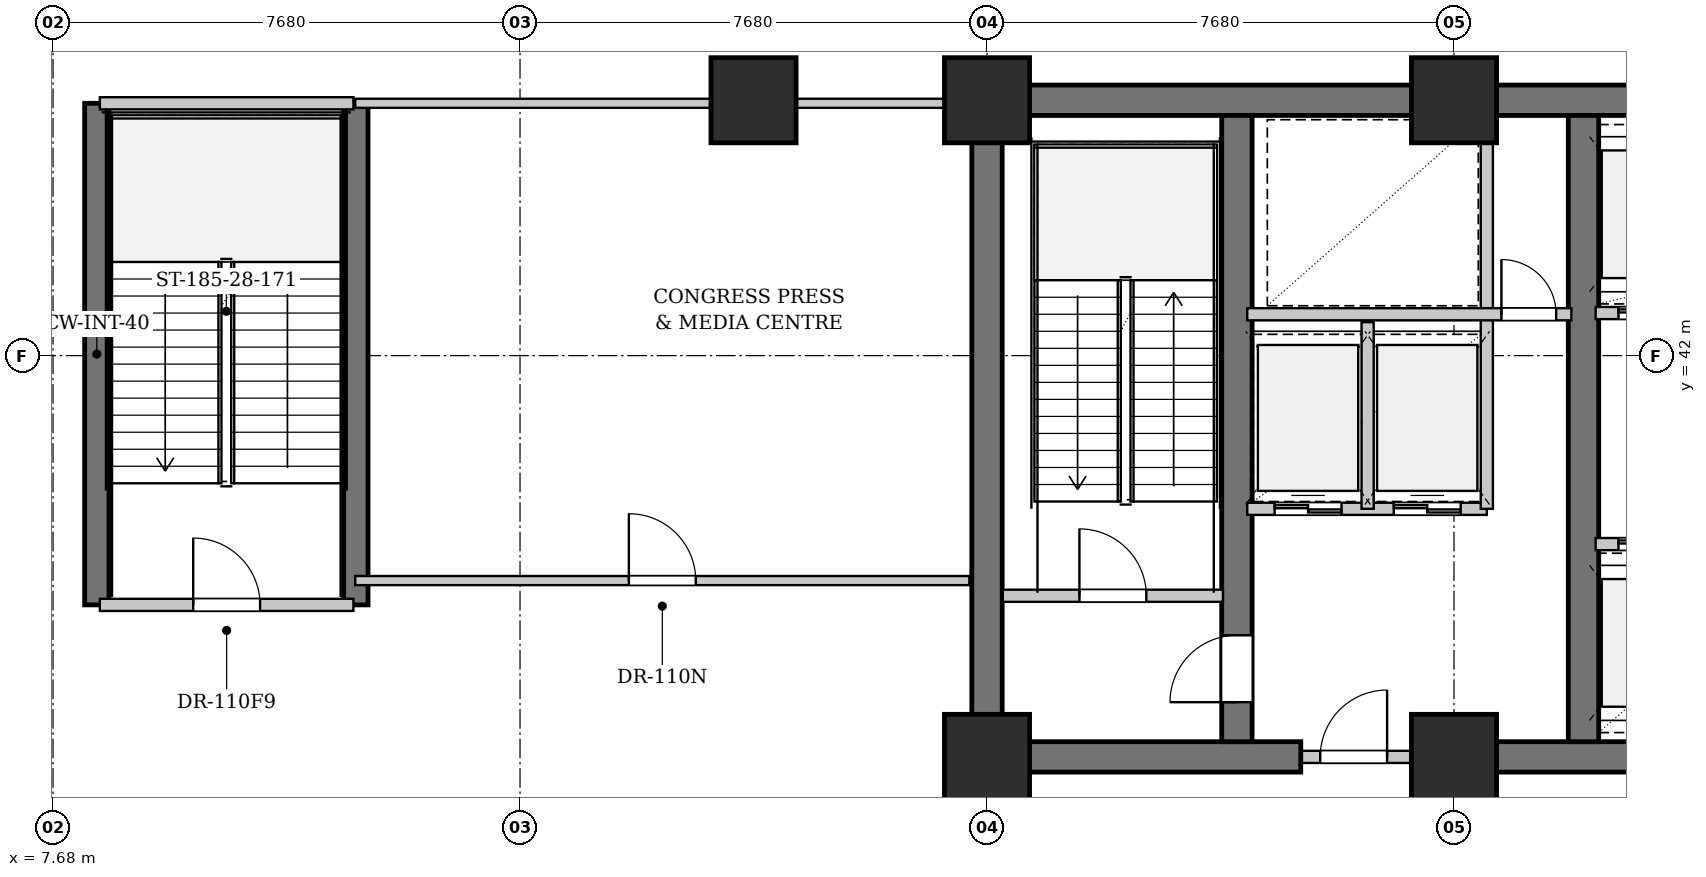
"""IFC4 building model, lengths in metres.
Left out: names, types, materials, properties, quantities, classifications, styles, units other than length and angle.
Written with IfcOpenShell. Run it as: python <this file> out.ifc"""

import sys

from ifc_helpers import new_model, si_unit, direction, frame, frame_2d, origin, origin_2d, place, context, subcontext, project, spatial, rectangle, extrude, element, fill, save


model = new_model("IFC4")
c1 = context("Model", 3, precision=1e-05, world=origin(), true_north=direction((0.0, 1.0)))
c2 = subcontext(c1, "Body", "Model", "MODEL_VIEW")
j1 = project(units=[si_unit("LENGTHUNIT", "METRE"), si_unit("PLANEANGLEUNIT", "RADIAN")], contexts=[c1])
p1 = place(None, origin())
s1 = spatial("IfcSite", under=j1, at=p1, CompositionType="ELEMENT")
p2 = place(p1, origin())
s2 = spatial("IfcBuilding", under=s1, at=p2, CompositionType="ELEMENT")
p3 = place(p2, frame((0.0, 0.0, 20.4)))
s3 = spatial("IfcBuildingStorey", under=s2, at=p3, CompositionType="ELEMENT", Elevation=20.4)
p4 = place(p3, frame((22.79, 46.2, 0.0), z_axis=(0.0, 0.0, 1.0), x_axis=(1.0, 0.0, 0.0)))
e1 = element("IfcWall", 1, at=p4, inside=s3, PredefinedType="SHEAR", context=c2, shape_type="SweptSolid", body=[
    extrude(rectangle(XDim=31.22, YDim=0.5, at=frame_2d((15.61, 0.0))), origin(), (0.0, 0.0, 1.0), 4.38),
])
p5 = place(p3, frame((22.79, 35.4, 0.0), z_axis=(0.0, 0.0, 1.0), x_axis=(1.0, 0.0, 0.0)))
e2 = element("IfcWall", 2, at=p5, inside=s3, PredefinedType="SHEAR", context=c2, shape_type="SweptSolid", body=[
    extrude(rectangle(XDim=5.41, YDim=0.5, at=frame_2d((2.705, 0.0))), origin(), (0.0, 0.0, 1.0), 4.38),
])
p6 = place(p3, frame((30.72, 35.4, 0.0), z_axis=(0.0, 0.0, 1.0), x_axis=(1.0, 0.0, 0.0)))
e3 = element("IfcWall", 3, at=p6, inside=s3, PredefinedType="SHEAR", context=c2, shape_type="SweptSolid", body=[
    extrude(rectangle(XDim=4.88, YDim=0.5, at=frame_2d((2.44, 0.0))), origin(), (0.0, 0.0, 1.0), 4.38),
])
p7 = place(p3, frame((23.04, 35.65, 0.0), z_axis=(0.0, 0.0, 1.0), x_axis=(0.0, 1.0, 0.0)))
e4 = element("IfcWall", 4, at=p7, inside=s3, PredefinedType="SHEAR", context=c2, shape_type="SweptSolid", body=[
    extrude(rectangle(XDim=10.3, YDim=0.5, at=frame_2d((5.15, 0.0))), origin(), (0.0, 0.0, 1.0), 4.38),
])
p8 = place(p3, frame((27.15, 35.65, 0.0), z_axis=(0.0, 0.0, 1.0), x_axis=(0.0, 1.0, 0.0)))
e5 = element("IfcWall", 5, at=p8, inside=s3, PredefinedType="SHEAR", context=c2, shape_type="SweptSolid", body=[
    extrude(rectangle(XDim=10.3, YDim=0.5, at=frame_2d((5.15, 0.0))), origin(), (0.0, 0.0, 1.0), 4.38),
])
p9 = place(p8, frame((0.65, 0.0, 0.0)))
e6 = element("IfcOpeningElement", 6, at=p9, cuts=e5, PredefinedType="OPENING", context=c2, shape_type="SweptSolid", body=[
    extrude(rectangle(XDim=1.1, YDim=2.15, at=frame_2d((0.55, 1.075))), frame((0.0, 0.26, 0.0), z_axis=(0.0, -1.0, 0.0), x_axis=(1.0, 0.0, 0.0)), (0.0, 0.0, 1.0), 0.52),
])
p10 = place(p3, frame((32.85, 35.65, 0.0), z_axis=(0.0, 0.0, 1.0), x_axis=(0.0, 1.0, 0.0)))
e7 = element("IfcWall", 7, at=p10, inside=s3, PredefinedType="SHEAR", context=c2, shape_type="SweptSolid", body=[
    extrude(rectangle(XDim=10.3, YDim=0.5, at=frame_2d((5.15, 0.0))), origin(), (0.0, 0.0, 1.0), 4.38),
])
for number, where, z_axis, x_axis in (
    (8, (8.4, 37.9, 0.0), (0.0, 0.0, 1.0), (0.0, 1.0, 0.0)),
    (9, (12.66, 37.9, 0.0), (0.0, 0.0, 1.0), (0.0, 1.0, 0.0)),
):
    element("IfcWall", number, at=place(p3, frame(where, z_axis=z_axis, x_axis=x_axis)), inside=s3, PredefinedType="SHEAR", context=c2, shape_type="SweptSolid", body=[
        extrude(rectangle(XDim=8.25, YDim=0.4, at=frame_2d((4.125, 0.0))), origin(), (0.0, 0.0, 1.0), 4.38),
    ])
for number, where, z_axis, x_axis in (
    (10, (23.04, 35.4, 0.0), (0.0, 0.0, 1.0), (1.0, 0.0, 0.0)),
    (11, (23.04, 46.2, 0.0), (0.0, 0.0, 1.0), (1.0, 0.0, 0.0)),
    (12, (30.72, 35.4, 0.0), (0.0, 0.0, 1.0), (1.0, 0.0, 0.0)),
    (13, (30.72, 46.2, 0.0), (0.0, 0.0, 1.0), (1.0, 0.0, 0.0)),
    (14, (19.2, 46.2, 0.0), (0.0, 0.0, 1.0), (1.0, 0.0, 0.0)),
):
    element("IfcColumn", number, at=place(p3, frame(where, z_axis=z_axis, x_axis=x_axis)), inside=s3, PredefinedType="COLUMN", context=c2, shape_type="SweptSolid", body=[
        extrude(rectangle(XDim=1.4, YDim=1.4, at=origin_2d()), origin(), (0.0, 0.0, 1.0), 4.8),
    ])
p11 = place(p3, frame((23.3, 38.05, 0.0), z_axis=(0.0, 0.0, 1.0), x_axis=(1.0, 0.0, 0.0)))
e15 = element("IfcWall", 15, at=p11, inside=s3, PredefinedType="PARTITIONING", context=c2, shape_type="SweptSolid", body=[
    extrude(rectangle(XDim=3.62, YDim=0.2, at=frame_2d((1.81, 0.0))), origin(), (0.0, 0.0, 1.0), 4.38),
])
p12 = place(p11, frame((1.26, 0.0, 0.0)))
e16 = element("IfcOpeningElement", 16, at=p12, cuts=e15, PredefinedType="OPENING", context=c2, shape_type="SweptSolid", body=[
    extrude(rectangle(XDim=1.1, YDim=2.15, at=frame_2d((0.55, 1.075))), frame((0.0, 0.11, 0.0), z_axis=(0.0, -1.0, 0.0), x_axis=(1.0, 0.0, 0.0)), (0.0, 0.0, 1.0), 0.22),
])
p13 = place(p3, frame((28.22, 35.4, 0.0), z_axis=(0.0, 0.0, 1.0), x_axis=(1.0, 0.0, 0.0)))
e17 = element("IfcWall", 17, at=p13, inside=s3, PredefinedType="PARTITIONING", context=c2, shape_type="SweptSolid", body=[
    extrude(rectangle(XDim=2.5, YDim=0.2, at=frame_2d((1.25, 0.0))), origin(), (0.0, 0.0, 1.0), 3.575),
])
p14 = place(p13, frame((0.3, 0.0, 0.0)))
e18 = element("IfcOpeningElement", 18, at=p14, cuts=e17, PredefinedType="OPENING", context=c2, shape_type="SweptSolid", body=[
    extrude(rectangle(XDim=1.1, YDim=2.15, at=frame_2d((0.55, 1.075))), frame((0.0, 0.11, 0.0), z_axis=(0.0, -1.0, 0.0), x_axis=(1.0, 0.0, 0.0)), (0.0, 0.0, 1.0), 0.22),
])
p15 = place(p3, frame((27.32, 39.48, 0.0), z_axis=(0.0, 0.0, 1.0), x_axis=(1.0, 0.0, 0.0)))
e19 = element("IfcWall", 19, at=p15, inside=s3, PredefinedType="PARTITIONING", context=c2, shape_type="SweptSolid", body=[
    extrude(rectangle(XDim=3.94, YDim=0.2, at=frame_2d((1.97, 0.0))), origin(), (0.0, 0.0, 1.0), 4.38),
])
p16 = place(p15, frame((0.45, 0.0, 0.0)))
e20 = element("IfcOpeningElement", 20, at=p16, cuts=e19, PredefinedType="OPENING", context=c2, shape_type="SweptSolid", body=[
    extrude(rectangle(XDim=1.1, YDim=2.2, at=frame_2d((0.55, 1.1))), frame((0.0, 0.11, 0.0), z_axis=(0.0, -1.0, 0.0), x_axis=(1.0, 0.0, 0.0)), (0.0, 0.0, 1.0), 0.22),
])
p17 = place(p15, frame((2.41, 0.0, 0.0)))
e21 = element("IfcOpeningElement", 21, at=p17, cuts=e19, PredefinedType="OPENING", context=c2, shape_type="SweptSolid", body=[
    extrude(rectangle(XDim=1.1, YDim=2.2, at=frame_2d((0.55, 1.1))), frame((0.0, 0.11, 0.0), z_axis=(0.0, -1.0, 0.0), x_axis=(1.0, 0.0, 0.0)), (0.0, 0.0, 1.0), 0.22),
])
p18 = place(p3, frame((29.3, 39.48, 0.0), z_axis=(0.0, 0.0, 1.0), x_axis=(0.0, 1.0, 0.0)))
e22 = element("IfcWall", 22, at=p18, inside=s3, PredefinedType="PARTITIONING", context=c2, shape_type="SweptSolid", body=[
    extrude(rectangle(XDim=3.07, YDim=0.2, at=frame_2d((1.535, 0.0))), origin(), (0.0, 0.0, 1.0), 4.38),
])
p19 = place(p3, frame((31.26, 39.48, 0.0), z_axis=(0.0, 0.0, 1.0), x_axis=(0.0, 1.0, 0.0)))
e23 = element("IfcWall", 23, at=p19, inside=s3, PredefinedType="PARTITIONING", context=c2, shape_type="SweptSolid", body=[
    extrude(rectangle(XDim=6.44, YDim=0.2, at=frame_2d((3.22, 0.0))), origin(), (0.0, 0.0, 1.0), 4.38),
])
p20 = place(p3, frame((27.32, 42.68, 0.0), z_axis=(0.0, 0.0, 1.0), x_axis=(1.0, 0.0, 0.0)))
e24 = element("IfcWall", 24, at=p20, inside=s3, PredefinedType="PARTITIONING", context=c2, shape_type="SweptSolid", body=[
    extrude(rectangle(XDim=5.33, YDim=0.2, at=frame_2d((2.665, 0.0))), origin(), (0.0, 0.0, 1.0), 4.38),
])
p21 = place(p20, frame((4.18, 0.0, 0.0)))
e25 = element("IfcOpeningElement", 25, at=p21, cuts=e24, PredefinedType="OPENING", context=c2, shape_type="SweptSolid", body=[
    extrude(rectangle(XDim=0.9, YDim=2.15, at=frame_2d((0.45, 1.075))), frame((0.0, 0.11, 0.0), z_axis=(0.0, -1.0, 0.0), x_axis=(1.0, 0.0, 0.0)), (0.0, 0.0, 1.0), 0.22),
])
p22 = place(p3, frame((33.05, 38.9, 0.0), z_axis=(0.0, 0.0, 1.0), x_axis=(1.0, 0.0, 0.0)))
e26 = element("IfcWall", 26, at=p22, inside=s3, PredefinedType="PARTITIONING", context=c2, shape_type="SweptSolid", body=[
    extrude(rectangle(XDim=3.57, YDim=0.2, at=frame_2d((1.785, 0.0))), origin(), (0.0, 0.0, 1.0), 4.38),
])
p23 = place(p22, frame((0.375, 0.0, 0.0)))
e27 = element("IfcOpeningElement", 27, at=p23, cuts=e26, PredefinedType="OPENING", context=c2, shape_type="SweptSolid", body=[
    extrude(rectangle(XDim=1.0, YDim=2.2, at=frame_2d((0.5, 1.1))), frame((0.0, 0.11, 0.0), z_axis=(0.0, -1.0, 0.0), x_axis=(1.0, 0.0, 0.0)), (0.0, 0.0, 1.0), 0.22),
])
p24 = place(p22, frame((2.125, 0.0, 0.0)))
e28 = element("IfcOpeningElement", 28, at=p24, cuts=e26, PredefinedType="OPENING", context=c2, shape_type="SweptSolid", body=[
    extrude(rectangle(XDim=1.0, YDim=2.2, at=frame_2d((0.5, 1.1))), frame((0.0, 0.11, 0.0), z_axis=(0.0, -1.0, 0.0), x_axis=(1.0, 0.0, 0.0)), (0.0, 0.0, 1.0), 0.22),
])
p25 = place(p3, frame((33.05, 42.7, 0.0), z_axis=(0.0, 0.0, 1.0), x_axis=(1.0, 0.0, 0.0)))
e29 = element("IfcWall", 29, at=p25, inside=s3, PredefinedType="PARTITIONING", context=c2, shape_type="SweptSolid", body=[
    extrude(rectangle(XDim=3.57, YDim=0.2, at=frame_2d((1.785, 0.0))), origin(), (0.0, 0.0, 1.0), 4.38),
])
p26 = place(p25, frame((0.375, 0.0, 0.0)))
e30 = element("IfcOpeningElement", 30, at=p26, cuts=e29, PredefinedType="OPENING", context=c2, shape_type="SweptSolid", body=[
    extrude(rectangle(XDim=1.0, YDim=2.2, at=frame_2d((0.5, 1.1))), frame((0.0, 0.11, 0.0), z_axis=(0.0, -1.0, 0.0), x_axis=(1.0, 0.0, 0.0)), (0.0, 0.0, 1.0), 0.22),
])
p27 = place(p25, frame((2.125, 0.0, 0.0)))
e31 = element("IfcOpeningElement", 31, at=p27, cuts=e29, PredefinedType="OPENING", context=c2, shape_type="SweptSolid", body=[
    extrude(rectangle(XDim=1.0, YDim=2.2, at=frame_2d((0.5, 1.1))), frame((0.0, 0.11, 0.0), z_axis=(0.0, -1.0, 0.0), x_axis=(1.0, 0.0, 0.0)), (0.0, 0.0, 1.0), 0.22),
])
p28 = place(p3, frame((8.45, 37.9, 0.0), z_axis=(0.0, 0.0, 1.0), x_axis=(1.0, 0.0, 0.0)))
e32 = element("IfcWall", 32, at=p28, inside=s3, PredefinedType="PARTITIONING", context=c2, shape_type="SweptSolid", body=[
    extrude(rectangle(XDim=4.17, YDim=0.2, at=frame_2d((2.085, 0.0))), origin(), (0.0, 0.0, 1.0), 4.38),
])
p29 = place(p28, frame((1.535, 0.0, 0.0)))
e33 = element("IfcOpeningElement", 33, at=p29, cuts=e32, PredefinedType="OPENING", context=c2, shape_type="SweptSolid", body=[
    extrude(rectangle(XDim=1.1, YDim=2.15, at=frame_2d((0.55, 1.075))), frame((0.0, 0.11, 0.0), z_axis=(0.0, -1.0, 0.0), x_axis=(1.0, 0.0, 0.0)), (0.0, 0.0, 1.0), 0.22),
])
p30 = place(p3, frame((8.45, 46.15, 0.0), z_axis=(0.0, 0.0, 1.0), x_axis=(1.0, 0.0, 0.0)))
e34 = element("IfcWall", 34, at=p30, inside=s3, PredefinedType="PARTITIONING", context=c2, shape_type="SweptSolid", body=[
    extrude(rectangle(XDim=4.17, YDim=0.2, at=frame_2d((2.085, 0.0))), origin(), (0.0, 0.0, 1.0), 4.38),
])
p31 = place(p3, frame((12.65, 38.3, 0.0), z_axis=(0.0, 0.0, 1.0), x_axis=(1.0, 0.0, 0.0)))
e35 = element("IfcWall", 35, at=p31, inside=s3, PredefinedType="PARTITIONING", context=c2, shape_type="SweptSolid", body=[
    extrude(rectangle(XDim=10.1, YDim=0.15, at=frame_2d((5.05, 0.0))), origin(), (0.0, 0.0, 1.0), 4.38),
])
p32 = place(p31, frame((4.5, 0.0, 0.0)))
e36 = element("IfcOpeningElement", 36, at=p32, cuts=e35, PredefinedType="OPENING", context=c2, shape_type="SweptSolid", body=[
    extrude(rectangle(XDim=1.1, YDim=2.15, at=frame_2d((0.55, 1.075))), frame((0.0, 0.085, 0.0), z_axis=(0.0, -1.0, 0.0), x_axis=(1.0, 0.0, 0.0)), (0.0, 0.0, 1.0), 0.17),
])
p33 = place(p3, frame((12.65, 46.15, 0.0), z_axis=(0.0, 0.0, 1.0), x_axis=(1.0, 0.0, 0.0)))
e37 = element("IfcWall", 37, at=p33, inside=s3, PredefinedType="PARTITIONING", context=c2, shape_type="SweptSolid", body=[
    extrude(rectangle(XDim=10.1, YDim=0.15, at=frame_2d((5.05, 0.0))), origin(), (0.0, 0.0, 1.0), 4.38),
])
p34 = place(p12, origin())
e38 = element("IfcDoor", 38, at=p34, inside=s3, OperationType="SINGLE_SWING_LEFT", PredefinedType="DOOR", context=c2, shape_type="SweptSolid", body=[
    extrude(rectangle(XDim=1.1, YDim=2.15, at=frame_2d((0.55, 1.075))), frame((0.0, 0.025, 0.0), z_axis=(0.0, -1.0, 0.0), x_axis=(1.0, 0.0, 0.0)), (0.0, 0.0, 1.0), 0.05),
])
fill(e16, e38)
p35 = place(p14, origin())
e39 = element("IfcDoor", 39, at=p35, inside=s3, OperationType="SINGLE_SWING_RIGHT", PredefinedType="DOOR", context=c2, shape_type="SweptSolid", body=[
    extrude(rectangle(XDim=1.1, YDim=2.15, at=frame_2d((0.55, 1.075))), frame((0.0, 0.025, 0.0), z_axis=(0.0, -1.0, 0.0), x_axis=(1.0, 0.0, 0.0)), (0.0, 0.0, 1.0), 0.05),
])
fill(e18, e39)
p36 = place(p16, origin())
e40 = element("IfcDoor", 40, at=p36, inside=s3, OperationType="DOUBLE_DOOR_SLIDING", PredefinedType="DOOR", context=c2, shape_type="SweptSolid", body=[
    extrude(rectangle(XDim=1.1, YDim=2.2, at=frame_2d((0.55, 1.1))), frame((0.0, 0.025, 0.0), z_axis=(0.0, -1.0, 0.0), x_axis=(1.0, 0.0, 0.0)), (0.0, 0.0, 1.0), 0.05),
])
fill(e20, e40)
p37 = place(p17, origin())
e41 = element("IfcDoor", 41, at=p37, inside=s3, OperationType="DOUBLE_DOOR_SLIDING", PredefinedType="DOOR", context=c2, shape_type="SweptSolid", body=[
    extrude(rectangle(XDim=1.1, YDim=2.2, at=frame_2d((0.55, 1.1))), frame((0.0, 0.025, 0.0), z_axis=(0.0, -1.0, 0.0), x_axis=(1.0, 0.0, 0.0)), (0.0, 0.0, 1.0), 0.05),
])
fill(e21, e41)
p38 = place(p21, origin())
e42 = element("IfcDoor", 42, at=p38, inside=s3, OperationType="SINGLE_SWING_LEFT", PredefinedType="DOOR", context=c2, shape_type="SweptSolid", body=[
    extrude(rectangle(XDim=0.9, YDim=2.15, at=frame_2d((0.45, 1.075))), frame((0.0, 0.025, 0.0), z_axis=(0.0, -1.0, 0.0), x_axis=(1.0, 0.0, 0.0)), (0.0, 0.0, 1.0), 0.05),
])
fill(e25, e42)
p39 = place(p23, origin())
e43 = element("IfcDoor", 43, at=p39, inside=s3, OperationType="DOUBLE_DOOR_SLIDING", PredefinedType="DOOR", context=c2, shape_type="SweptSolid", body=[
    extrude(rectangle(XDim=1.0, YDim=2.2, at=frame_2d((0.5, 1.1))), frame((0.0, 0.025, 0.0), z_axis=(0.0, -1.0, 0.0), x_axis=(1.0, 0.0, 0.0)), (0.0, 0.0, 1.0), 0.05),
])
fill(e27, e43)
p40 = place(p26, origin())
e44 = element("IfcDoor", 44, at=p40, inside=s3, OperationType="DOUBLE_DOOR_SLIDING", PredefinedType="DOOR", context=c2, shape_type="SweptSolid", body=[
    extrude(rectangle(XDim=1.0, YDim=2.2, at=frame_2d((0.5, 1.1))), frame((0.0, 0.025, 0.0), z_axis=(0.0, -1.0, 0.0), x_axis=(1.0, 0.0, 0.0)), (0.0, 0.0, 1.0), 0.05),
])
fill(e30, e44)
p41 = place(p29, origin())
e45 = element("IfcDoor", 45, at=p41, inside=s3, OperationType="SINGLE_SWING_LEFT", PredefinedType="DOOR", context=c2, shape_type="SweptSolid", body=[
    extrude(rectangle(XDim=1.1, YDim=2.15, at=frame_2d((0.55, 1.075))), frame((0.0, 0.025, 0.0), z_axis=(0.0, -1.0, 0.0), x_axis=(1.0, 0.0, 0.0)), (0.0, 0.0, 1.0), 0.05),
])
fill(e33, e45)
p42 = place(p32, origin())
e46 = element("IfcDoor", 46, at=p42, inside=s3, OperationType="SINGLE_SWING_LEFT", PredefinedType="DOOR", context=c2, shape_type="SweptSolid", body=[
    extrude(rectangle(XDim=1.1, YDim=2.15, at=frame_2d((0.55, 1.075))), frame((0.0, 0.025, 0.0), z_axis=(0.0, -1.0, 0.0), x_axis=(1.0, 0.0, 0.0)), (0.0, 0.0, 1.0), 0.05),
])
fill(e36, e46)
p43 = place(p9, origin())
e47 = element("IfcDoor", 47, at=p43, inside=s3, OperationType="SINGLE_SWING_LEFT", PredefinedType="DOOR", context=c2, shape_type="SweptSolid", body=[
    extrude(rectangle(XDim=1.1, YDim=2.15, at=frame_2d((0.55, 1.075))), frame((0.0, 0.025, 0.0), z_axis=(0.0, -1.0, 0.0), x_axis=(1.0, 0.0, 0.0)), (0.0, 0.0, 1.0), 0.05),
])
fill(e6, e47)
save(model, sys.argv[1])
